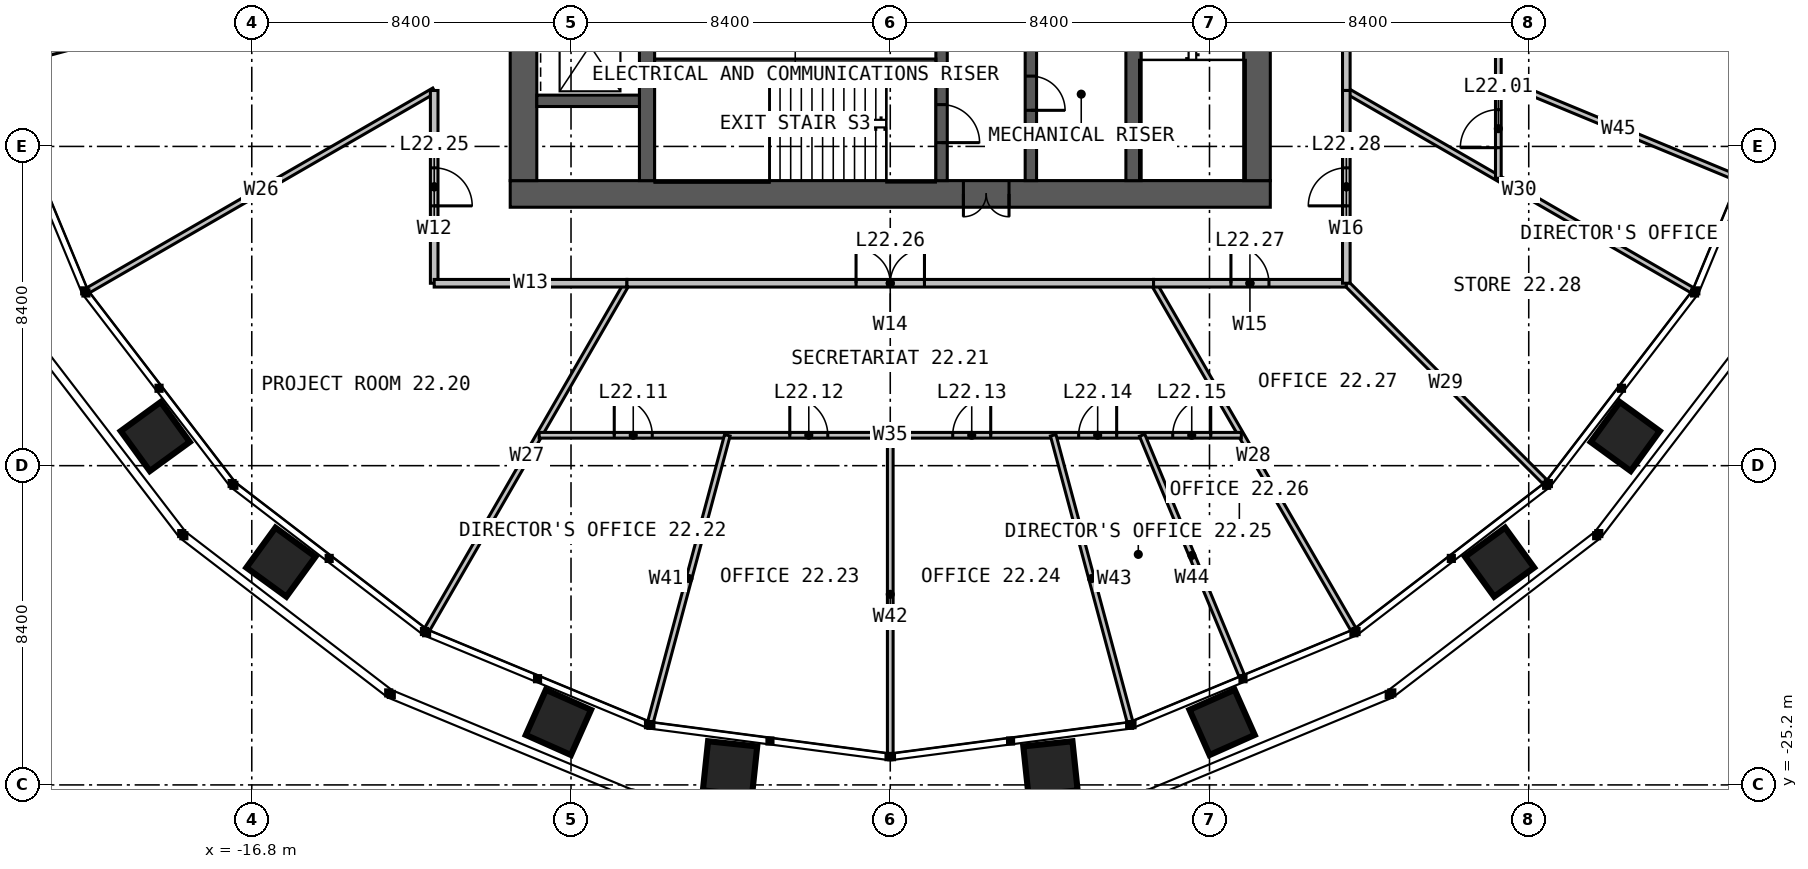
"""IFC4 building model, lengths in metres.
Left out: names, types, materials, properties, quantities, classifications, styles, units other than length and angle.
Written with IfcOpenShell. Run it as: python <this file> out.ifc"""

import sys

from ifc_helpers import new_model, si_unit, direction, frame, frame_2d, origin, place, context, subcontext, project, spatial, rectangle, extrude, element, fill, save


model = new_model("IFC4")
c1 = context("Model", 3, precision=1e-05, world=origin(), true_north=direction((0.0, 1.0)))
c2 = subcontext(c1, "Body", "Model", "MODEL_VIEW")
j1 = project(units=[si_unit("LENGTHUNIT", "METRE"), si_unit("PLANEANGLEUNIT", "RADIAN")], contexts=[c1])
p1 = place(None, origin())
s1 = spatial("IfcSite", under=j1, at=p1, CompositionType="ELEMENT")
p2 = place(p1, origin())
s2 = spatial("IfcBuilding", under=s1, at=p2, CompositionType="ELEMENT")
p3 = place(p2, frame((0.0, 0.0, 94.0)))
s3 = spatial("IfcBuildingStorey", under=s2, at=p3, CompositionType="ELEMENT", Elevation=94.0)
p4 = place(p3, frame((10.0, -9.65, 0.0), z_axis=(0.0, 0.0, 1.0), x_axis=(-1.0, 0.0, 0.0)))
e1 = element("IfcWall", 1, at=p4, inside=s3, PredefinedType="SOLIDWALL", context=c2, shape_type="SweptSolid", body=[
    extrude(rectangle(XDim=20.0, YDim=0.7, at=frame_2d((10.0, 0.0))), origin(), (0.0, 0.0, 1.0), 4.0),
])
p5 = place(p4, frame((6.875, 0.0, 0.0)))
e2 = element("IfcOpeningElement", 2, at=p5, cuts=e1, PredefinedType="OPENING", context=c2, shape_type="SweptSolid", body=[
    extrude(rectangle(XDim=1.2, YDim=2.2, at=frame_2d((0.6, 1.1))), frame((0.0, 0.36, 0.0), z_axis=(0.0, -1.0, 0.0), x_axis=(1.0, 0.0, 0.0)), (0.0, 0.0, 1.0), 0.72),
])
for number, where, z_axis, x_axis in (
    (3, (9.65, -9.3, 0.0), (0.0, 0.0, 1.0), (0.0, 1.0, 0.0)),
    (4, (-9.65, 9.3, 0.0), (0.0, 0.0, 1.0), (0.0, -1.0, 0.0)),
):
    element("IfcWall", number, at=place(p3, frame(where, z_axis=z_axis, x_axis=x_axis)), inside=s3, PredefinedType="SOLIDWALL", context=c2, shape_type="SweptSolid", body=[
        extrude(rectangle(XDim=18.6, YDim=0.7, at=frame_2d((9.3, 0.0))), origin(), (0.0, 0.0, 1.0), 4.0),
    ])
p6 = place(p3, frame((-6.4, -9.3, 0.0), z_axis=(0.0, 0.0, 1.0), x_axis=(0.0, 1.0, 0.0)))
e5 = element("IfcWall", 5, at=p6, inside=s3, PredefinedType="SOLIDWALL", context=c2, shape_type="SweptSolid", body=[
    extrude(rectangle(XDim=18.6, YDim=0.4, at=frame_2d((9.3, 0.0))), origin(), (0.0, 0.0, 1.0), 4.0),
])
p7 = place(p6, frame((8.8, 0.0, 0.0)))
e6 = element("IfcOpeningElement", 6, at=p7, cuts=e5, PredefinedType="OPENING", context=c2, shape_type="SweptSolid", body=[
    extrude(rectangle(XDim=1.0, YDim=2.2, at=frame_2d((0.5, 1.1))), frame((0.0, 0.21, 0.0), z_axis=(0.0, -1.0, 0.0), x_axis=(1.0, 0.0, 0.0)), (0.0, 0.0, 1.0), 0.42),
])
p8 = place(p3, frame((6.4, 9.3, 0.0), z_axis=(0.0, 0.0, 1.0), x_axis=(0.0, -1.0, 0.0)))
e7 = element("IfcWall", 7, at=p8, inside=s3, PredefinedType="SOLIDWALL", context=c2, shape_type="SweptSolid", body=[
    extrude(rectangle(XDim=18.6, YDim=0.4, at=frame_2d((9.3, 0.0))), origin(), (0.0, 0.0, 1.0), 4.0),
])
p9 = place(p8, frame((8.8, 0.0, 0.0)))
e8 = element("IfcOpeningElement", 8, at=p9, cuts=e7, PredefinedType="OPENING", context=c2, shape_type="SweptSolid", body=[
    extrude(rectangle(XDim=1.0, YDim=2.2, at=frame_2d((0.5, 1.1))), frame((0.0, 0.21, 0.0), z_axis=(0.0, -1.0, 0.0), x_axis=(1.0, 0.0, 0.0)), (0.0, 0.0, 1.0), 0.42),
])
p10 = place(p3, frame((1.35, -1.45, 0.0), z_axis=(0.0, 0.0, 1.0), x_axis=(0.0, -1.0, 0.0)))
e9 = element("IfcWall", 9, at=p10, inside=s3, PredefinedType="SOLIDWALL", context=c2, shape_type="SweptSolid", body=[
    extrude(rectangle(XDim=7.85, YDim=0.3, at=frame_2d((3.925, 0.0))), origin(), (0.0, 0.0, 1.0), 4.0),
])
p11 = place(p10, frame((5.85, 0.0, 0.0)))
e10 = element("IfcOpeningElement", 10, at=p11, cuts=e9, PredefinedType="OPENING", context=c2, shape_type="SweptSolid", body=[
    extrude(rectangle(XDim=1.0, YDim=2.2, at=frame_2d((0.5, 1.1))), frame((0.0, 0.16, 0.0), z_axis=(0.0, -1.0, 0.0), x_axis=(1.0, 0.0, 0.0)), (0.0, 0.0, 1.0), 0.32),
])
p12 = place(p10, frame((3.525, 0.0, 0.0)))
e11 = element("IfcOpeningElement", 11, at=p12, cuts=e9, PredefinedType="OPENING", context=c2, shape_type="SweptSolid", body=[
    extrude(rectangle(XDim=0.9, YDim=2.2, at=frame_2d((0.45, 1.1))), frame((0.0, 0.16, 0.0), z_axis=(0.0, -1.0, 0.0), x_axis=(1.0, 0.0, 0.0)), (0.0, 0.0, 1.0), 0.32),
])
p13 = place(p3, frame((3.7, -1.45, 0.0), z_axis=(0.0, 0.0, 1.0), x_axis=(0.0, -1.0, 0.0)))
e12 = element("IfcWall", 12, at=p13, inside=s3, PredefinedType="SOLIDWALL", context=c2, shape_type="SweptSolid", body=[
    extrude(rectangle(XDim=7.85, YDim=0.3, at=frame_2d((3.925, 0.0))), origin(), (0.0, 0.0, 1.0), 4.0),
])
p14 = place(p13, frame((5.1, 0.0, 0.0)))
e13 = element("IfcOpeningElement", 13, at=p14, cuts=e12, PredefinedType="OPENING", context=c2, shape_type="SweptSolid", body=[
    extrude(rectangle(XDim=0.9, YDim=2.2, at=frame_2d((0.45, 1.1))), frame((0.0, 0.16, 0.0), z_axis=(0.0, -1.0, 0.0), x_axis=(1.0, 0.0, 0.0)), (0.0, 0.0, 1.0), 0.32),
])
p15 = place(p3, frame((-6.2, -6.2, 0.0), z_axis=(0.0, 0.0, 1.0), x_axis=(1.0, 0.0, 0.0)))
e14 = element("IfcWall", 14, at=p15, inside=s3, PredefinedType="SOLIDWALL", context=c2, shape_type="SweptSolid", body=[
    extrude(rectangle(XDim=7.4, YDim=0.2, at=frame_2d((3.7, 0.0))), origin(), (0.0, 0.0, 1.0), 4.0),
])
p16 = place(p3, frame((-9.3, -7.2, 0.0), z_axis=(0.0, 0.0, 1.0), x_axis=(1.0, 0.0, 0.0)))
e15 = element("IfcWall", 15, at=p16, inside=s3, PredefinedType="SOLIDWALL", context=c2, shape_type="SweptSolid", body=[
    extrude(rectangle(XDim=2.7, YDim=0.3, at=frame_2d((1.35, 0.0))), origin(), (0.0, 0.0, 1.0), 4.0),
])
p17 = place(p3, frame((12.0, -6.928, 0.0), z_axis=(0.0, 0.0, 1.0), x_axis=(0.866028201971, -0.499995153367, 0.0)))
e16 = element("IfcWall", 16, at=p17, inside=s3, PredefinedType="PARTITIONING", context=c2, shape_type="SweptSolid", body=[
    extrude(rectangle(XDim=10.514, YDim=0.15, at=frame_2d((5.257, 0.0))), origin(), (0.0, 0.0, 1.0), 2.79),
])
p18 = place(p3, frame((-12.0, -3.215, 0.0), z_axis=(0.0, 0.0, 1.0), x_axis=(-0.965926615498, -0.258816099716, 0.0)))
e17 = element("IfcWall", 17, at=p18, inside=s3, PredefinedType="PARTITIONING", context=c2, shape_type="SweptSolid", body=[
    extrude(rectangle(XDim=11.947, YDim=0.15, at=frame_2d((5.973, 0.0))), origin(), (0.0, 0.0, 1.0), 2.79),
])
for number, where, z_axis, x_axis in (
    (18, (-12.0, -6.928, 0.0), (0.0, 0.0, 1.0), (-0.866, -0.5, 0.0)),
    (19, (-6.928, -12.0, 0.0), (0.0, 0.0, 1.0), (-0.5, -0.866, 0.0)),
    (20, (6.928, -12.0, 0.0), (0.0, 0.0, 1.0), (0.5, -0.866, 0.0)),
):
    element("IfcWall", number, at=place(p3, frame(where, z_axis=z_axis, x_axis=x_axis)), inside=s3, PredefinedType="PARTITIONING", context=c2, shape_type="SweptSolid", body=[
        extrude(rectangle(XDim=10.514, YDim=0.15, at=frame_2d((5.257, 0.0))), origin(), (0.0, 0.0, 1.0), 2.79),
    ])
p19 = place(p3, frame((12.0, -12.0, 0.0), z_axis=(0.0, 0.0, 1.0), x_axis=(0.707106781187, -0.707106781187, 0.0)))
e21 = element("IfcWall", 21, at=p19, inside=s3, PredefinedType="PARTITIONING", context=c2, shape_type="SweptSolid", body=[
    extrude(rectangle(XDim=7.4, YDim=0.15, at=frame_2d((3.7, 0.0))), origin(), (0.0, 0.0, 1.0), 2.79),
])
p20 = place(p3, frame((16.0, -9.238, 0.0), z_axis=(0.0, 0.0, 1.0), x_axis=(0.0, 1.0, 0.0)))
e22 = element("IfcWall", 22, at=p20, inside=s3, PredefinedType="PARTITIONING", context=c2, shape_type="SweptSolid", body=[
    extrude(rectangle(XDim=9.238, YDim=0.15, at=frame_2d((4.619, 0.0))), origin(), (0.0, 0.0, 1.0), 2.79),
])
p21 = place(p20, frame((0.805, 0.0, 0.0)))
e23 = element("IfcOpeningElement", 23, at=p21, cuts=e22, PredefinedType="OPENING", context=c2, shape_type="SweptSolid", body=[
    extrude(rectangle(XDim=1.0, YDim=2.2, at=frame_2d((0.5, 1.1))), frame((0.0, 0.085, 0.0), z_axis=(0.0, -1.0, 0.0), x_axis=(1.0, 0.0, 0.0)), (0.0, 0.0, 1.0), 0.17),
])
p22 = place(p20, frame((5.424, 0.0, 0.0)))
e24 = element("IfcOpeningElement", 24, at=p22, cuts=e22, PredefinedType="OPENING", context=c2, shape_type="SweptSolid", body=[
    extrude(rectangle(XDim=1.0, YDim=2.2, at=frame_2d((0.5, 1.1))), frame((0.0, 0.085, 0.0), z_axis=(0.0, -1.0, 0.0), x_axis=(1.0, 0.0, 0.0)), (0.0, 0.0, 1.0), 0.17),
])
p23 = place(p3, frame((16.0, -6.627, 0.0), z_axis=(0.0, 0.0, 1.0), x_axis=(0.923878127723, -0.382686823805, 0.0)))
e25 = element("IfcWall", 25, at=p23, inside=s3, PredefinedType="PARTITIONING", context=c2, shape_type="SweptSolid", body=[
    extrude(rectangle(XDim=6.844, YDim=0.15, at=frame_2d((3.422, 0.0))), origin(), (0.0, 0.0, 1.0), 2.79),
])
p24 = place(p3, frame((12.0, -6.928, 0.0), z_axis=(0.0, 0.0, 1.0), x_axis=(0.0, 1.0, 0.0)))
e26 = element("IfcWall", 26, at=p24, inside=s3, PredefinedType="PARTITIONING", context=c2, shape_type="SweptSolid", body=[
    extrude(rectangle(XDim=6.928, YDim=0.2, at=frame_2d((3.464, 0.0))), origin(), (0.0, 0.0, 1.0), 3.8),
])
p25 = place(p24, frame((2.964, 0.0, 0.0)))
e27 = element("IfcOpeningElement", 27, at=p25, cuts=e26, PredefinedType="OPENING", context=c2, shape_type="SweptSolid", body=[
    extrude(rectangle(XDim=1.0, YDim=2.2, at=frame_2d((0.5, 1.1))), frame((0.0, 0.11, 0.0), z_axis=(0.0, -1.0, 0.0), x_axis=(1.0, 0.0, 0.0)), (0.0, 0.0, 1.0), 0.22),
])
p26 = place(p3, frame((-12.0, -6.928, 0.0), z_axis=(0.0, 0.0, 1.0), x_axis=(0.0, -1.0, 0.0)))
e28 = element("IfcWall", 28, at=p26, inside=s3, PredefinedType="PARTITIONING", context=c2, shape_type="SweptSolid", body=[
    extrude(rectangle(XDim=5.072, YDim=0.2, at=frame_2d((2.536, 0.0))), origin(), (0.0, 0.0, 1.0), 3.8),
])
p27 = place(p26, frame((2.036, 0.0, 0.0)))
e29 = element("IfcOpeningElement", 29, at=p27, cuts=e28, PredefinedType="OPENING", context=c2, shape_type="SweptSolid", body=[
    extrude(rectangle(XDim=1.0, YDim=2.2, at=frame_2d((0.5, 1.1))), frame((0.0, 0.11, 0.0), z_axis=(0.0, -1.0, 0.0), x_axis=(1.0, 0.0, 0.0)), (0.0, 0.0, 1.0), 0.22),
])
p28 = place(p3, frame((-12.0, -12.0, 0.0), z_axis=(0.0, 0.0, 1.0), x_axis=(1.0, 0.0, 0.0)))
e30 = element("IfcWall", 30, at=p28, inside=s3, PredefinedType="PARTITIONING", context=c2, shape_type="SweptSolid", body=[
    extrude(rectangle(XDim=5.072, YDim=0.2, at=frame_2d((2.536, 0.0))), origin(), (0.0, 0.0, 1.0), 3.8),
])
p29 = place(p3, frame((-9.238, -16.0, 0.0), z_axis=(0.0, 0.0, 1.0), x_axis=(1.0, 0.0, 0.0)))
e31 = element("IfcWall", 31, at=p29, inside=s3, PredefinedType="PARTITIONING", context=c2, shape_type="SweptSolid", body=[
    extrude(rectangle(XDim=18.475, YDim=0.15, at=frame_2d((9.238, 0.0))), origin(), (0.0, 0.0, 1.0), 2.79),
])
p30 = place(p29, frame((1.975, 0.0, 0.0)))
e32 = element("IfcOpeningElement", 32, at=p30, cuts=e31, PredefinedType="OPENING", context=c2, shape_type="SweptSolid", body=[
    extrude(rectangle(XDim=1.0, YDim=2.2, at=frame_2d((0.5, 1.1))), frame((0.0, 0.085, 0.0), z_axis=(0.0, -1.0, 0.0), x_axis=(1.0, 0.0, 0.0)), (0.0, 0.0, 1.0), 0.17),
])
p31 = place(p29, frame((6.594, 0.0, 0.0)))
e33 = element("IfcOpeningElement", 33, at=p31, cuts=e31, PredefinedType="OPENING", context=c2, shape_type="SweptSolid", body=[
    extrude(rectangle(XDim=1.0, YDim=2.2, at=frame_2d((0.5, 1.1))), frame((0.0, 0.085, 0.0), z_axis=(0.0, -1.0, 0.0), x_axis=(1.0, 0.0, 0.0)), (0.0, 0.0, 1.0), 0.17),
])
p32 = place(p29, frame((10.881, 0.0, 0.0)))
e34 = element("IfcOpeningElement", 34, at=p32, cuts=e31, PredefinedType="OPENING", context=c2, shape_type="SweptSolid", body=[
    extrude(rectangle(XDim=1.0, YDim=2.2, at=frame_2d((0.5, 1.1))), frame((0.0, 0.085, 0.0), z_axis=(0.0, -1.0, 0.0), x_axis=(1.0, 0.0, 0.0)), (0.0, 0.0, 1.0), 0.17),
])
p33 = place(p29, frame((14.195, 0.0, 0.0)))
e35 = element("IfcOpeningElement", 35, at=p33, cuts=e31, PredefinedType="OPENING", context=c2, shape_type="SweptSolid", body=[
    extrude(rectangle(XDim=1.0, YDim=2.2, at=frame_2d((0.5, 1.1))), frame((0.0, 0.085, 0.0), z_axis=(0.0, -1.0, 0.0), x_axis=(1.0, 0.0, 0.0)), (0.0, 0.0, 1.0), 0.17),
])
p34 = place(p29, frame((16.67, 0.0, 0.0)))
e36 = element("IfcOpeningElement", 36, at=p34, cuts=e31, PredefinedType="OPENING", context=c2, shape_type="SweptSolid", body=[
    extrude(rectangle(XDim=1.0, YDim=2.2, at=frame_2d((0.5, 1.1))), frame((0.0, 0.085, 0.0), z_axis=(0.0, -1.0, 0.0), x_axis=(1.0, 0.0, 0.0)), (0.0, 0.0, 1.0), 0.17),
])
p35 = place(p3, frame((-4.287, -16.0, 0.0), z_axis=(0.0, 0.0, 1.0), x_axis=(-0.258816859097, -0.965926412025, 0.0)))
e37 = element("IfcWall", 37, at=p35, inside=s3, PredefinedType="PARTITIONING", context=c2, shape_type="SweptSolid", body=[
    extrude(rectangle(XDim=7.806, YDim=0.15, at=frame_2d((3.903, 0.0))), origin(), (0.0, 0.0, 1.0), 2.79),
])
p36 = place(p3, frame((0.0, -16.0, 0.0), z_axis=(0.0, 0.0, 1.0), x_axis=(0.0, -1.0, 0.0)))
e38 = element("IfcWall", 38, at=p36, inside=s3, PredefinedType="PARTITIONING", context=c2, shape_type="SweptSolid", body=[
    extrude(rectangle(XDim=8.37, YDim=0.15, at=frame_2d((4.185, 0.0))), origin(), (0.0, 0.0, 1.0), 2.79),
])
p37 = place(p3, frame((4.287, -16.0, 0.0), z_axis=(0.0, 0.0, 1.0), x_axis=(0.258816859097, -0.965926412025, 0.0)))
e39 = element("IfcWall", 39, at=p37, inside=s3, PredefinedType="PARTITIONING", context=c2, shape_type="SweptSolid", body=[
    extrude(rectangle(XDim=7.806, YDim=0.15, at=frame_2d((3.903, 0.0))), origin(), (0.0, 0.0, 1.0), 2.79),
])
p38 = place(p3, frame((6.627, -16.0, 0.0), z_axis=(0.0, 0.0, 1.0), x_axis=(0.382686823805, -0.923878127723, 0.0)))
e40 = element("IfcWall", 40, at=p38, inside=s3, PredefinedType="PARTITIONING", context=c2, shape_type="SweptSolid", body=[
    extrude(rectangle(XDim=6.844, YDim=0.15, at=frame_2d((3.422, 0.0))), origin(), (0.0, 0.0, 1.0), 2.79),
])
p39 = place(p3, frame((-6.928, -12.0, 0.0), z_axis=(0.0, 0.0, 1.0), x_axis=(1.0, 0.0, 0.0)))
e41 = element("IfcWall", 41, at=p39, inside=s3, PredefinedType="PARTITIONING", context=c2, shape_type="SweptSolid", body=[
    extrude(rectangle(XDim=13.856, YDim=0.2, at=frame_2d((6.928, 0.0))), origin(), (0.0, 0.0, 1.0), 3.8),
])
p40 = place(p39, frame((6.028, 0.0, 0.0)))
e42 = element("IfcOpeningElement", 42, at=p40, cuts=e41, PredefinedType="OPENING", context=c2, shape_type="SweptSolid", body=[
    extrude(rectangle(XDim=1.8, YDim=2.2, at=frame_2d((0.9, 1.1))), frame((0.0, 0.11, 0.0), z_axis=(0.0, -1.0, 0.0), x_axis=(1.0, 0.0, 0.0)), (0.0, 0.0, 1.0), 0.22),
])
p41 = place(p3, frame((6.928, -12.0, 0.0), z_axis=(0.0, 0.0, 1.0), x_axis=(1.0, 0.0, 0.0)))
e43 = element("IfcWall", 43, at=p41, inside=s3, PredefinedType="PARTITIONING", context=c2, shape_type="SweptSolid", body=[
    extrude(rectangle(XDim=5.072, YDim=0.2, at=frame_2d((2.536, 0.0))), origin(), (0.0, 0.0, 1.0), 3.8),
])
p42 = place(p41, frame((2.036, 0.0, 0.0)))
e44 = element("IfcOpeningElement", 44, at=p42, cuts=e43, PredefinedType="OPENING", context=c2, shape_type="SweptSolid", body=[
    extrude(rectangle(XDim=1.0, YDim=2.2, at=frame_2d((0.5, 1.1))), frame((0.0, 0.11, 0.0), z_axis=(0.0, -1.0, 0.0), x_axis=(1.0, 0.0, 0.0)), (0.0, 0.0, 1.0), 0.22),
])
p43 = place(p3, frame((12.0, -12.0, 0.0), z_axis=(0.0, 0.0, 1.0), x_axis=(0.0, 1.0, 0.0)))
e45 = element("IfcWall", 45, at=p43, inside=s3, PredefinedType="PARTITIONING", context=c2, shape_type="SweptSolid", body=[
    extrude(rectangle(XDim=5.072, YDim=0.2, at=frame_2d((2.536, 0.0))), origin(), (0.0, 0.0, 1.0), 3.8),
])
p44 = place(p43, frame((2.036, 0.0, 0.0)))
e46 = element("IfcOpeningElement", 46, at=p44, cuts=e45, PredefinedType="OPENING", context=c2, shape_type="SweptSolid", body=[
    extrude(rectangle(XDim=1.0, YDim=2.2, at=frame_2d((0.5, 1.1))), frame((0.0, 0.11, 0.0), z_axis=(0.0, -1.0, 0.0), x_axis=(1.0, 0.0, 0.0)), (0.0, 0.0, 1.0), 0.22),
])
p45 = place(p5, origin())
e47 = element("IfcDoor", 47, at=p45, inside=s3, OperationType="DOUBLE_DOOR_SINGLE_SWING", PredefinedType="DOOR", context=c2, shape_type="SweptSolid", body=[
    extrude(rectangle(XDim=1.2, YDim=2.2, at=frame_2d((0.6, 1.1))), frame((0.0, 0.025, 0.0), z_axis=(0.0, -1.0, 0.0), x_axis=(1.0, 0.0, 0.0)), (0.0, 0.0, 1.0), 0.05),
])
fill(e2, e47)
p46 = place(p11, origin())
e48 = element("IfcDoor", 48, at=p46, inside=s3, OperationType="SINGLE_SWING_RIGHT", PredefinedType="DOOR", context=c2, shape_type="SweptSolid", body=[
    extrude(rectangle(XDim=1.0, YDim=2.2, at=frame_2d((0.5, 1.1))), frame((0.0, 0.025, 0.0), z_axis=(0.0, -1.0, 0.0), x_axis=(1.0, 0.0, 0.0)), (0.0, 0.0, 1.0), 0.05),
])
fill(e10, e48)
p47 = place(p14, origin())
e49 = element("IfcDoor", 49, at=p47, inside=s3, OperationType="SINGLE_SWING_RIGHT", PredefinedType="DOOR", context=c2, shape_type="SweptSolid", body=[
    extrude(rectangle(XDim=0.9, YDim=2.2, at=frame_2d((0.45, 1.1))), frame((0.0, 0.025, 0.0), z_axis=(0.0, -1.0, 0.0), x_axis=(1.0, 0.0, 0.0)), (0.0, 0.0, 1.0), 0.05),
])
fill(e13, e49)
p48 = place(p21, origin())
e50 = element("IfcDoor", 50, at=p48, inside=s3, OperationType="SINGLE_SWING_LEFT", PredefinedType="DOOR", context=c2, shape_type="SweptSolid", body=[
    extrude(rectangle(XDim=1.0, YDim=2.2, at=frame_2d((0.5, 1.1))), frame((0.0, 0.025, 0.0), z_axis=(0.0, -1.0, 0.0), x_axis=(1.0, 0.0, 0.0)), (0.0, 0.0, 1.0), 0.05),
])
fill(e23, e50)
p49 = place(p27, origin())
e51 = element("IfcDoor", 51, at=p49, inside=s3, OperationType="SINGLE_SWING_RIGHT", PredefinedType="DOOR", context=c2, shape_type="SweptSolid", body=[
    extrude(rectangle(XDim=1.0, YDim=2.2, at=frame_2d((0.5, 1.1))), frame((0.0, 0.025, 0.0), z_axis=(0.0, -1.0, 0.0), x_axis=(1.0, 0.0, 0.0)), (0.0, 0.0, 1.0), 0.05),
])
fill(e29, e51)
p50 = place(p30, origin())
e52 = element("IfcDoor", 52, at=p50, inside=s3, OperationType="SINGLE_SWING_LEFT", PredefinedType="DOOR", context=c2, shape_type="SweptSolid", body=[
    extrude(rectangle(XDim=1.0, YDim=2.2, at=frame_2d((0.5, 1.1))), frame((0.0, 0.025, 0.0), z_axis=(0.0, -1.0, 0.0), x_axis=(1.0, 0.0, 0.0)), (0.0, 0.0, 1.0), 0.05),
])
fill(e32, e52)
p51 = place(p31, origin())
e53 = element("IfcDoor", 53, at=p51, inside=s3, OperationType="SINGLE_SWING_LEFT", PredefinedType="DOOR", context=c2, shape_type="SweptSolid", body=[
    extrude(rectangle(XDim=1.0, YDim=2.2, at=frame_2d((0.5, 1.1))), frame((0.0, 0.025, 0.0), z_axis=(0.0, -1.0, 0.0), x_axis=(1.0, 0.0, 0.0)), (0.0, 0.0, 1.0), 0.05),
])
fill(e33, e53)
p52 = place(p32, origin())
e54 = element("IfcDoor", 54, at=p52, inside=s3, OperationType="SINGLE_SWING_RIGHT", PredefinedType="DOOR", context=c2, shape_type="SweptSolid", body=[
    extrude(rectangle(XDim=1.0, YDim=2.2, at=frame_2d((0.5, 1.1))), frame((0.0, 0.025, 0.0), z_axis=(0.0, -1.0, 0.0), x_axis=(1.0, 0.0, 0.0)), (0.0, 0.0, 1.0), 0.05),
])
fill(e34, e54)
p53 = place(p33, origin())
e55 = element("IfcDoor", 55, at=p53, inside=s3, OperationType="SINGLE_SWING_RIGHT", PredefinedType="DOOR", context=c2, shape_type="SweptSolid", body=[
    extrude(rectangle(XDim=1.0, YDim=2.2, at=frame_2d((0.5, 1.1))), frame((0.0, 0.025, 0.0), z_axis=(0.0, -1.0, 0.0), x_axis=(1.0, 0.0, 0.0)), (0.0, 0.0, 1.0), 0.05),
])
fill(e35, e55)
p54 = place(p34, origin())
e56 = element("IfcDoor", 56, at=p54, inside=s3, OperationType="SINGLE_SWING_RIGHT", PredefinedType="DOOR", context=c2, shape_type="SweptSolid", body=[
    extrude(rectangle(XDim=1.0, YDim=2.2, at=frame_2d((0.5, 1.1))), frame((0.0, 0.025, 0.0), z_axis=(0.0, -1.0, 0.0), x_axis=(1.0, 0.0, 0.0)), (0.0, 0.0, 1.0), 0.05),
])
fill(e36, e56)
p55 = place(p40, origin())
e57 = element("IfcDoor", 57, at=p55, inside=s3, OperationType="DOUBLE_DOOR_SINGLE_SWING", PredefinedType="DOOR", context=c2, shape_type="SweptSolid", body=[
    extrude(rectangle(XDim=1.8, YDim=2.2, at=frame_2d((0.9, 1.1))), frame((0.0, 0.025, 0.0), z_axis=(0.0, -1.0, 0.0), x_axis=(1.0, 0.0, 0.0)), (0.0, 0.0, 1.0), 0.05),
])
fill(e42, e57)
p56 = place(p42, origin())
e58 = element("IfcDoor", 58, at=p56, inside=s3, OperationType="SINGLE_SWING_LEFT", PredefinedType="DOOR", context=c2, shape_type="SweptSolid", body=[
    extrude(rectangle(XDim=1.0, YDim=2.2, at=frame_2d((0.5, 1.1))), frame((0.0, 0.025, 0.0), z_axis=(0.0, -1.0, 0.0), x_axis=(1.0, 0.0, 0.0)), (0.0, 0.0, 1.0), 0.05),
])
fill(e44, e58)
p57 = place(p44, origin())
e59 = element("IfcDoor", 59, at=p57, inside=s3, OperationType="SINGLE_SWING_LEFT", PredefinedType="DOOR", context=c2, shape_type="SweptSolid", body=[
    extrude(rectangle(XDim=1.0, YDim=2.2, at=frame_2d((0.5, 1.1))), frame((0.0, 0.025, 0.0), z_axis=(0.0, -1.0, 0.0), x_axis=(1.0, 0.0, 0.0)), (0.0, 0.0, 1.0), 0.05),
])
fill(e46, e59)
save(model, sys.argv[1])
